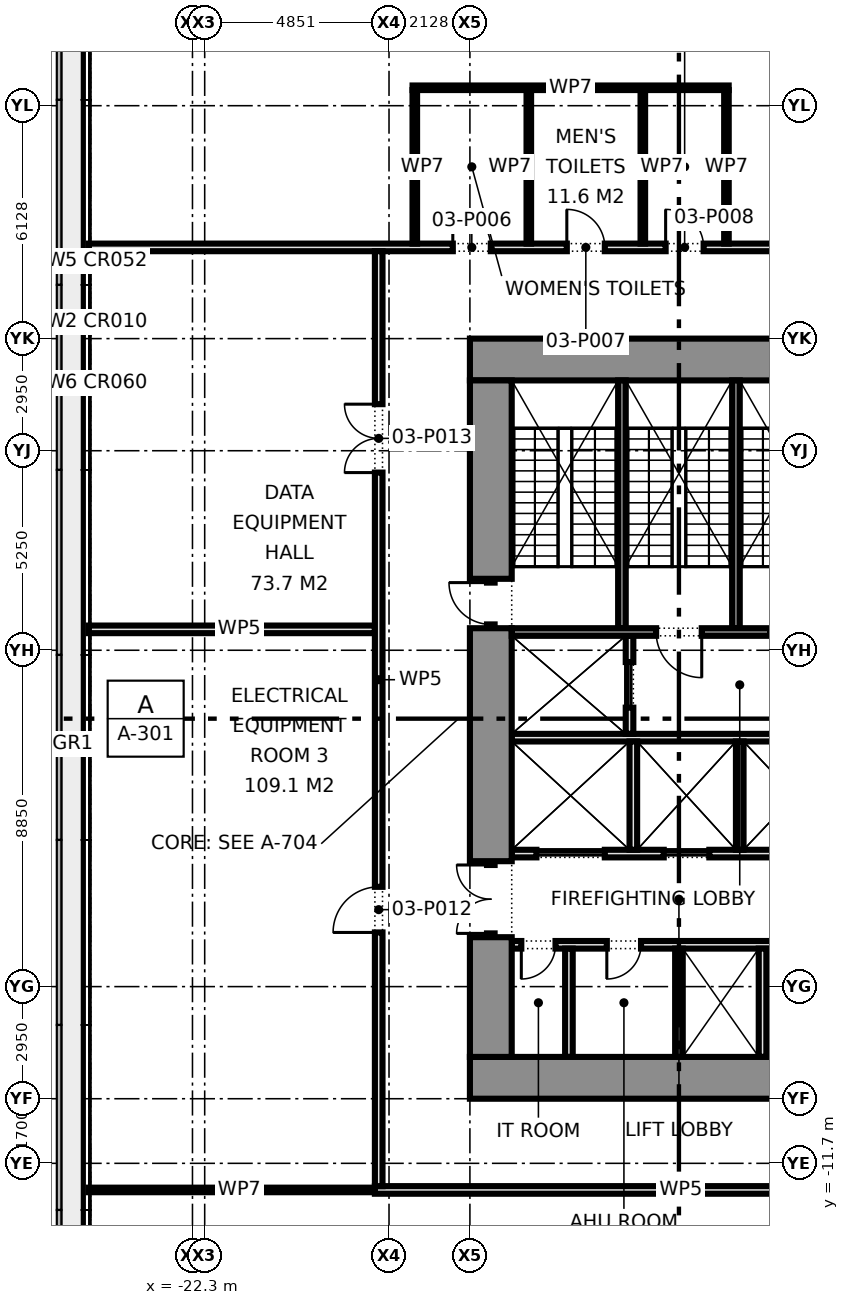
"""IFC4 building model, lengths in metres.
Left out: names, types, materials, properties, quantities, classifications, styles, units other than length and angle.
Written with IfcOpenShell. Run it as: python <this file> out.ifc"""

import sys

from ifc_helpers import new_model, si_unit, direction, frame, frame_2d, origin, place, context, subcontext, project, spatial, rectangle, extrude, element, fill, save


model = new_model("IFC4")
c1 = context("Model", 3, precision=1e-05, world=origin(), true_north=direction((0.0, 1.0)))
c2 = subcontext(c1, "Body", "Model", "MODEL_VIEW")
j1 = project(units=[si_unit("LENGTHUNIT", "METRE"), si_unit("PLANEANGLEUNIT", "RADIAN")], contexts=[c1])
p1 = place(None, origin())
s1 = spatial("IfcSite", under=j1, at=p1, CompositionType="ELEMENT")
p2 = place(p1, origin())
s2 = spatial("IfcBuilding", under=s1, at=p2, CompositionType="ELEMENT")
p3 = place(p2, frame((0.0, 0.0, 11.3)))
s3 = spatial("IfcBuildingStorey", under=s2, at=p3, CompositionType="ELEMENT", Elevation=11.3)
for number, where, z_axis, x_axis in (
    (1, (-15.0, -9.45, 0.0), (0.0, 0.0, 1.0), (1.0, 0.0, 0.0)),
    (2, (-15.0, 9.45, 0.0), (0.0, 0.0, 1.0), (1.0, 0.0, 0.0)),
):
    element("IfcWall", number, at=place(p3, frame(where, z_axis=z_axis, x_axis=x_axis)), inside=s3, PredefinedType="SHEAR", context=c2, shape_type="SweptSolid", body=[
        extrude(rectangle(XDim=11.0, YDim=1.1, at=frame_2d((5.5, 0.0))), origin(), (0.0, 0.0, 1.0), 4.575),
    ])
p4 = place(p3, frame((-14.45, -8.9, 0.0), z_axis=(0.0, 0.0, 1.0), x_axis=(0.0, 1.0, 0.0)))
e3 = element("IfcWall", 3, at=p4, inside=s3, PredefinedType="SHEAR", context=c2, shape_type="SweptSolid", body=[
    extrude(rectangle(XDim=3.15, YDim=1.1, at=frame_2d((1.575, 0.0))), origin(), (0.0, 0.0, 1.0), 4.575),
])
p5 = place(p3, frame((-14.45, -5.75, 0.0), z_axis=(0.0, 0.0, 1.0), x_axis=(0.0, 1.0, 0.0)))
e4 = element("IfcWall", 4, at=p5, inside=s3, PredefinedType="PARTITIONING", context=c2, shape_type="SweptSolid", body=[
    extrude(rectangle(XDim=2.0, YDim=0.2, at=frame_2d((1.0, 0.0))), origin(), (0.0, 0.0, 1.0), 2.4),
])
p6 = place(p5, frame((0.1, 0.0, 0.0)))
e5 = element("IfcOpeningElement", 5, at=p6, cuts=e4, PredefinedType="OPENING", context=c2, shape_type="SweptSolid", body=[
    extrude(rectangle(XDim=1.8, YDim=2.1, at=frame_2d((0.9, 1.05))), frame((0.0, 0.11, 0.0), z_axis=(0.0, -1.0, 0.0), x_axis=(1.0, 0.0, 0.0)), (0.0, 0.0, 1.0), 0.22),
])
p7 = place(p3, frame((-14.45, -3.75, 0.0), z_axis=(0.0, 0.0, 1.0), x_axis=(0.0, 1.0, 0.0)))
e6 = element("IfcWall", 6, at=p7, inside=s3, PredefinedType="SHEAR", context=c2, shape_type="SweptSolid", body=[
    extrude(rectangle(XDim=6.13, YDim=1.1, at=frame_2d((3.065, 0.0))), origin(), (0.0, 0.0, 1.0), 4.575),
])
p8 = place(p3, frame((-14.45, 2.38, 0.0), z_axis=(0.0, 0.0, 1.0), x_axis=(0.0, 1.0, 0.0)))
e7 = element("IfcWall", 7, at=p8, inside=s3, PredefinedType="SHEAR", context=c2, shape_type="SweptSolid", body=[
    extrude(rectangle(XDim=1.3, YDim=0.2, at=frame_2d((0.65, 0.0))), origin(), (0.0, 0.0, 1.0), 2.4),
])
p9 = place(p8, frame((0.1, 0.0, 0.0)))
e8 = element("IfcOpeningElement", 8, at=p9, cuts=e7, PredefinedType="OPENING", context=c2, shape_type="SweptSolid", body=[
    extrude(rectangle(XDim=1.1, YDim=2.1, at=frame_2d((0.55, 1.05))), frame((0.0, 0.11, 0.0), z_axis=(0.0, -1.0, 0.0), x_axis=(1.0, 0.0, 0.0)), (0.0, 0.0, 1.0), 0.22),
])
p10 = place(p3, frame((-14.45, 3.68, 0.0), z_axis=(0.0, 0.0, 1.0), x_axis=(0.0, 1.0, 0.0)))
e9 = element("IfcWall", 9, at=p10, inside=s3, PredefinedType="SHEAR", context=c2, shape_type="SweptSolid", body=[
    extrude(rectangle(XDim=5.22, YDim=1.1, at=frame_2d((2.61, 0.0))), origin(), (0.0, 0.0, 1.0), 4.575),
])
p11 = place(p3, frame((-13.9, -5.95, 0.0), z_axis=(0.0, 0.0, 1.0), x_axis=(1.0, 0.0, 0.0)))
e10 = element("IfcWall", 10, at=p11, inside=s3, PredefinedType="PARTITIONING", context=c2, shape_type="SweptSolid", body=[
    extrude(rectangle(XDim=8.8, YDim=0.2, at=frame_2d((4.4, 0.0))), origin(), (0.0, 0.0, 1.0), 4.575),
])
p12 = place(p11, frame((0.252, 0.0, 0.0)))
e11 = element("IfcOpeningElement", 11, at=p12, cuts=e10, PredefinedType="OPENING", context=c2, shape_type="SweptSolid", body=[
    extrude(rectangle(XDim=0.9, YDim=2.1, at=frame_2d((0.45, 1.05))), frame((0.0, 0.11, 0.0), z_axis=(0.0, -1.0, 0.0), x_axis=(1.0, 0.0, 0.0)), (0.0, 0.0, 1.0), 0.22),
])
p13 = place(p11, frame((2.502, 0.0, 0.0)))
e12 = element("IfcOpeningElement", 12, at=p13, cuts=e10, PredefinedType="OPENING", context=c2, shape_type="SweptSolid", body=[
    extrude(rectangle(XDim=0.9, YDim=2.1, at=frame_2d((0.45, 1.05))), frame((0.0, 0.11, 0.0), z_axis=(0.0, -1.0, 0.0), x_axis=(1.0, 0.0, 0.0)), (0.0, 0.0, 1.0), 0.22),
])
p14 = place(p3, frame((-13.9, -3.55, 0.0), z_axis=(0.0, 0.0, 1.0), x_axis=(1.0, 0.0, 0.0)))
e13 = element("IfcWall", 13, at=p14, inside=s3, PredefinedType="PARTITIONING", context=c2, shape_type="SweptSolid", body=[
    extrude(rectangle(XDim=8.8, YDim=0.2, at=frame_2d((4.4, 0.0))), origin(), (0.0, 0.0, 1.0), 4.575),
])
p15 = place(p14, frame((0.65, 0.0, 0.0)))
e14 = element("IfcOpeningElement", 14, at=p15, cuts=e13, PredefinedType="OPENING", context=c2, shape_type="SweptSolid", body=[
    extrude(rectangle(XDim=1.8, YDim=2.1, at=frame_2d((0.9, 1.05))), frame((0.0, 0.11, 0.0), z_axis=(0.0, -1.0, 0.0), x_axis=(1.0, 0.0, 0.0)), (0.0, 0.0, 1.0), 0.22),
])
p16 = place(p14, frame((4.0, 0.0, 0.0)))
e15 = element("IfcOpeningElement", 15, at=p16, cuts=e13, PredefinedType="OPENING", context=c2, shape_type="SweptSolid", body=[
    extrude(rectangle(XDim=1.2, YDim=2.1, at=frame_2d((0.6, 1.05))), frame((0.0, 0.11, 0.0), z_axis=(0.0, -1.0, 0.0), x_axis=(1.0, 0.0, 0.0)), (0.0, 0.0, 1.0), 0.22),
])
p17 = place(p14, frame((6.85, 0.0, 0.0)))
e16 = element("IfcOpeningElement", 16, at=p17, cuts=e13, PredefinedType="OPENING", context=c2, shape_type="SweptSolid", body=[
    extrude(rectangle(XDim=1.2, YDim=2.1, at=frame_2d((0.6, 1.05))), frame((0.0, 0.11, 0.0), z_axis=(0.0, -1.0, 0.0), x_axis=(1.0, 0.0, 0.0)), (0.0, 0.0, 1.0), 0.22),
])
p18 = place(p3, frame((-13.9, -0.5, 0.0), z_axis=(0.0, 0.0, 1.0), x_axis=(1.0, 0.0, 0.0)))
e17 = element("IfcWall", 17, at=p18, inside=s3, PredefinedType="PARTITIONING", context=c2, shape_type="SweptSolid", body=[
    extrude(rectangle(XDim=8.8, YDim=0.2, at=frame_2d((4.4, 0.0))), origin(), (0.0, 0.0, 1.0), 4.575),
])
p19 = place(p3, frame((-10.8, -0.4, 0.0), z_axis=(0.0, 0.0, 1.0), x_axis=(0.0, 1.0, 0.0)))
e18 = element("IfcWall", 18, at=p19, inside=s3, PredefinedType="PARTITIONING", context=c2, shape_type="SweptSolid", body=[
    extrude(rectangle(XDim=2.58, YDim=0.2, at=frame_2d((1.29, 0.0))), origin(), (0.0, 0.0, 1.0), 4.575),
])
p20 = place(p19, frame((0.69, 0.0, 0.0)))
e19 = element("IfcOpeningElement", 19, at=p20, cuts=e18, PredefinedType="OPENING", context=c2, shape_type="SweptSolid", body=[
    extrude(rectangle(XDim=1.2, YDim=2.1, at=frame_2d((0.6, 1.05))), frame((0.0, 0.11, 0.0), z_axis=(0.0, -1.0, 0.0), x_axis=(1.0, 0.0, 0.0)), (0.0, 0.0, 1.0), 0.22),
])
p21 = place(p3, frame((-13.9, 2.28, 0.0), z_axis=(0.0, 0.0, 1.0), x_axis=(1.0, 0.0, 0.0)))
e20 = element("IfcWall", 20, at=p21, inside=s3, PredefinedType="SHEAR", context=c2, shape_type="SweptSolid", body=[
    extrude(rectangle(XDim=8.8, YDim=0.2, at=frame_2d((4.4, 0.0))), origin(), (0.0, 0.0, 1.0), 4.575),
])
p22 = place(p21, frame((3.8, 0.0, 0.0)))
e21 = element("IfcOpeningElement", 21, at=p22, cuts=e20, PredefinedType="OPENING", context=c2, shape_type="SweptSolid", body=[
    extrude(rectangle(XDim=1.2, YDim=2.1, at=frame_2d((0.6, 1.05))), frame((0.0, 0.11, 0.0), z_axis=(0.0, -1.0, 0.0), x_axis=(1.0, 0.0, 0.0)), (0.0, 0.0, 1.0), 0.22),
])
p23 = place(p21, frame((6.8, 0.0, 0.0)))
e22 = element("IfcOpeningElement", 22, at=p23, cuts=e20, PredefinedType="OPENING", context=c2, shape_type="SweptSolid", body=[
    extrude(rectangle(XDim=1.2, YDim=2.1, at=frame_2d((0.6, 1.05))), frame((0.0, 0.11, 0.0), z_axis=(0.0, -1.0, 0.0), x_axis=(1.0, 0.0, 0.0)), (0.0, 0.0, 1.0), 0.22),
])
for number, where, z_axis, x_axis in (
    (23, (-11.0, 2.38, 0.0), (0.0, 0.0, 1.0), (0.0, 1.0, 0.0)),
    (24, (-8.0, 2.38, 0.0), (0.0, 0.0, 1.0), (0.0, 1.0, 0.0)),
):
    element("IfcWall", number, at=place(p3, frame(where, z_axis=z_axis, x_axis=x_axis)), inside=s3, PredefinedType="SHEAR", context=c2, shape_type="SweptSolid", body=[
        extrude(rectangle(XDim=6.52, YDim=0.2, at=frame_2d((3.26, 0.0))), origin(), (0.0, 0.0, 1.0), 4.575),
    ])
for number, where, z_axis, x_axis in (
    (25, (-9.5, -8.9, 0.0), (0.0, 0.0, 1.0), (0.0, 1.0, 0.0)),
    (26, (-7.3, -8.9, 0.0), (0.0, 0.0, 1.0), (0.0, 1.0, 0.0)),
    (27, (-12.395, -8.9, 0.0), (0.0, 0.0, 1.0), (0.0, 1.0, 0.0)),
    (28, (-10.7, -3.45, 0.0), (0.0, 0.0, 1.0), (0.0, 1.0, 0.0)),
    (29, (-7.9, -3.45, 0.0), (0.0, 0.0, 1.0), (0.0, 1.0, 0.0)),
):
    element("IfcWall", number, at=place(p3, frame(where, z_axis=z_axis, x_axis=x_axis)), inside=s3, PredefinedType="PARTITIONING", context=c2, shape_type="SweptSolid", body=[
        extrude(rectangle(XDim=2.85, YDim=0.2, at=frame_2d((1.425, 0.0))), origin(), (0.0, 0.0, 1.0), 4.575),
    ])
p24 = place(p3, frame((-17.5, -12.4, 0.0), z_axis=(0.0, 0.0, 1.0), x_axis=(1.0, 0.0, 0.0)))
e30 = element("IfcWall", 30, at=p24, inside=s3, PredefinedType="PARTITIONING", context=c2, shape_type="SweptSolid", body=[
    extrude(rectangle(XDim=16.1, YDim=0.2, at=frame_2d((8.05, 0.0))), origin(), (0.0, 0.0, 1.0), 4.575),
])
p25 = place(p3, frame((-25.03, 2.35, 0.0), z_axis=(0.0, 0.0, 1.0), x_axis=(1.0, 0.0, 0.0)))
e31 = element("IfcWall", 31, at=p25, inside=s3, PredefinedType="PARTITIONING", context=c2, shape_type="SweptSolid", body=[
    extrude(rectangle(XDim=7.53, YDim=0.2, at=frame_2d((3.765, 0.0))), origin(), (0.0, 0.0, 1.0), 4.575),
])
p26 = place(p3, frame((-25.03, 12.4, 0.0), z_axis=(0.0, 0.0, 1.0), x_axis=(1.0, 0.0, 0.0)))
e32 = element("IfcWall", 32, at=p26, inside=s3, PredefinedType="PARTITIONING", context=c2, shape_type="SweptSolid", body=[
    extrude(rectangle(XDim=50.06, YDim=0.2, at=frame_2d((25.03, 0.0))), origin(), (0.0, 0.0, 1.0), 4.575),
])
p27 = place(p26, frame((21.18, 0.0, 0.0)))
e33 = element("IfcOpeningElement", 33, at=p27, cuts=e32, PredefinedType="OPENING", context=c2, shape_type="SweptSolid", body=[
    extrude(rectangle(XDim=1.8, YDim=2.1, at=frame_2d((0.9, 1.05))), frame((0.0, 0.11, 0.0), z_axis=(0.0, -1.0, 0.0), x_axis=(1.0, 0.0, 0.0)), (0.0, 0.0, 1.0), 0.22),
])
p28 = place(p26, frame((9.58, 0.0, 0.0)))
e34 = element("IfcOpeningElement", 34, at=p28, cuts=e32, PredefinedType="OPENING", context=c2, shape_type="SweptSolid", body=[
    extrude(rectangle(XDim=1.0, YDim=2.1, at=frame_2d((0.5, 1.05))), frame((0.0, 0.11, 0.0), z_axis=(0.0, -1.0, 0.0), x_axis=(1.0, 0.0, 0.0)), (0.0, 0.0, 1.0), 0.22),
])
p29 = place(p26, frame((12.58, 0.0, 0.0)))
e35 = element("IfcOpeningElement", 35, at=p29, cuts=e32, PredefinedType="OPENING", context=c2, shape_type="SweptSolid", body=[
    extrude(rectangle(XDim=1.0, YDim=2.1, at=frame_2d((0.5, 1.05))), frame((0.0, 0.11, 0.0), z_axis=(0.0, -1.0, 0.0), x_axis=(1.0, 0.0, 0.0)), (0.0, 0.0, 1.0), 0.22),
])
p30 = place(p26, frame((15.18, 0.0, 0.0)))
e36 = element("IfcOpeningElement", 36, at=p30, cuts=e32, PredefinedType="OPENING", context=c2, shape_type="SweptSolid", body=[
    extrude(rectangle(XDim=1.0, YDim=2.1, at=frame_2d((0.5, 1.05))), frame((0.0, 0.11, 0.0), z_axis=(0.0, -1.0, 0.0), x_axis=(1.0, 0.0, 0.0)), (0.0, 0.0, 1.0), 0.22),
])
p31 = place(p26, frame((34.01, 0.0, 0.0)))
e37 = element("IfcOpeningElement", 37, at=p31, cuts=e32, PredefinedType="OPENING", context=c2, shape_type="SweptSolid", body=[
    extrude(rectangle(XDim=1.8, YDim=2.1, at=frame_2d((0.9, 1.05))), frame((0.0, 0.11, 0.0), z_axis=(0.0, -1.0, 0.0), x_axis=(1.0, 0.0, 0.0)), (0.0, 0.0, 1.0), 0.22),
])
p32 = place(p3, frame((-17.4, -12.3, 0.0), z_axis=(0.0, 0.0, 1.0), x_axis=(0.0, 1.0, 0.0)))
e38 = element("IfcWall", 38, at=p32, inside=s3, PredefinedType="PARTITIONING", context=c2, shape_type="SweptSolid", body=[
    extrude(rectangle(XDim=24.6, YDim=0.2, at=frame_2d((12.3, 0.0))), origin(), (0.0, 0.0, 1.0), 4.575),
])
p33 = place(p32, frame((6.675, 0.0, 0.0)))
e39 = element("IfcOpeningElement", 39, at=p33, cuts=e38, PredefinedType="OPENING", context=c2, shape_type="SweptSolid", body=[
    extrude(rectangle(XDim=1.2, YDim=2.1, at=frame_2d((0.6, 1.05))), frame((0.0, 0.11, 0.0), z_axis=(0.0, -1.0, 0.0), x_axis=(1.0, 0.0, 0.0)), (0.0, 0.0, 1.0), 0.22),
])
p34 = place(p32, frame((18.775, 0.0, 0.0)))
e40 = element("IfcOpeningElement", 40, at=p34, cuts=e38, PredefinedType="OPENING", context=c2, shape_type="SweptSolid", body=[
    extrude(rectangle(XDim=1.8, YDim=2.1, at=frame_2d((0.9, 1.05))), frame((0.0, 0.11, 0.0), z_axis=(0.0, -1.0, 0.0), x_axis=(1.0, 0.0, 0.0)), (0.0, 0.0, 1.0), 0.22),
])
p35 = place(p3, frame((-25.03, -12.4, 0.0), z_axis=(0.0, 0.0, 1.0), x_axis=(1.0, 0.0, 0.0)))
e41 = element("IfcWall", 41, at=p35, inside=s3, PredefinedType="PARTITIONING", context=c2, shape_type="SweptSolid", body=[
    extrude(rectangle(XDim=7.53, YDim=0.12, at=frame_2d((3.765, 0.0))), origin(), (0.0, 0.0, 1.0), 4.575),
])
p36 = place(p3, frame((-16.509, 16.6, 0.0), z_axis=(0.0, 0.0, 1.0), x_axis=(1.0, 0.0, 0.0)))
e42 = element("IfcWall", 42, at=p36, inside=s3, PredefinedType="PARTITIONING", context=c2, shape_type="SweptSolid", body=[
    extrude(rectangle(XDim=8.318, YDim=0.12, at=frame_2d((4.159, 0.0))), origin(), (0.0, 0.0, 1.0), 4.575),
])
p37 = place(p3, frame((-8.25, 12.5, 0.0), z_axis=(0.0, 0.0, 1.0), x_axis=(0.0, 1.0, 0.0)))
e43 = element("IfcWall", 43, at=p37, inside=s3, PredefinedType="PARTITIONING", context=c2, shape_type="SweptSolid", body=[
    extrude(rectangle(XDim=4.039, YDim=0.12, at=frame_2d((2.02, 0.0))), origin(), (0.0, 0.0, 1.0), 4.575),
])
for number, where, z_axis, x_axis in (
    (44, (-10.45, 12.5, 0.0), (0.0, 0.0, 1.0), (0.0, 1.0, 0.0)),
    (45, (-13.45, 12.5, 0.0), (0.0, 0.0, 1.0), (0.0, 1.0, 0.0)),
):
    element("IfcWall", number, at=place(p3, frame(where, z_axis=z_axis, x_axis=x_axis)), inside=s3, PredefinedType="PARTITIONING", context=c2, shape_type="SweptSolid", body=[
        extrude(rectangle(XDim=4.04, YDim=0.12, at=frame_2d((2.02, 0.0))), origin(), (0.0, 0.0, 1.0), 4.575),
    ])
p38 = place(p3, frame((-16.45, 12.5, 0.0), z_axis=(0.0, 0.0, 1.0), x_axis=(0.0, 1.0, 0.0)))
e46 = element("IfcWall", 46, at=p38, inside=s3, PredefinedType="PARTITIONING", context=c2, shape_type="SweptSolid", body=[
    extrude(rectangle(XDim=4.039, YDim=0.12, at=frame_2d((2.02, 0.0))), origin(), (0.0, 0.0, 1.0), 4.575),
])
p39 = place(p6, origin())
e47 = element("IfcDoor", 47, at=p39, inside=s3, OperationType="DOUBLE_DOOR_SINGLE_SWING", PredefinedType="DOOR", context=c2, shape_type="SweptSolid", body=[
    extrude(rectangle(XDim=1.8, YDim=2.1, at=frame_2d((0.9, 1.05))), frame((0.0, 0.025, 0.0), z_axis=(0.0, -1.0, 0.0), x_axis=(1.0, 0.0, 0.0)), (0.0, 0.0, 1.0), 0.05),
])
fill(e5, e47)
p40 = place(p9, origin())
e48 = element("IfcDoor", 48, at=p40, inside=s3, OperationType="SINGLE_SWING_RIGHT", PredefinedType="DOOR", context=c2, shape_type="SweptSolid", body=[
    extrude(rectangle(XDim=1.1, YDim=2.1, at=frame_2d((0.55, 1.05))), frame((0.0, 0.025, 0.0), z_axis=(0.0, -1.0, 0.0), x_axis=(1.0, 0.0, 0.0)), (0.0, 0.0, 1.0), 0.05),
])
fill(e8, e48)
p41 = place(p15, origin())
e49 = element("IfcDoor", 49, at=p41, inside=s3, OperationType="DOUBLE_DOOR_SLIDING", PredefinedType="DOOR", context=c2, shape_type="SweptSolid", body=[
    extrude(rectangle(XDim=1.8, YDim=2.1, at=frame_2d((0.9, 1.05))), frame((0.0, 0.025, 0.0), z_axis=(0.0, -1.0, 0.0), x_axis=(1.0, 0.0, 0.0)), (0.0, 0.0, 1.0), 0.05),
])
fill(e14, e49)
p42 = place(p16, origin())
e50 = element("IfcDoor", 50, at=p42, inside=s3, OperationType="DOUBLE_DOOR_SLIDING", PredefinedType="DOOR", context=c2, shape_type="SweptSolid", body=[
    extrude(rectangle(XDim=1.2, YDim=2.1, at=frame_2d((0.6, 1.05))), frame((0.0, 0.025, 0.0), z_axis=(0.0, -1.0, 0.0), x_axis=(1.0, 0.0, 0.0)), (0.0, 0.0, 1.0), 0.05),
])
fill(e15, e50)
p43 = place(p20, origin())
e51 = element("IfcDoor", 51, at=p43, inside=s3, OperationType="DOUBLE_DOOR_SLIDING", PredefinedType="DOOR", context=c2, shape_type="SweptSolid", body=[
    extrude(rectangle(XDim=1.2, YDim=2.1, at=frame_2d((0.6, 1.05))), frame((0.0, 0.025, 0.0), z_axis=(0.0, -1.0, 0.0), x_axis=(1.0, 0.0, 0.0)), (0.0, 0.0, 1.0), 0.05),
])
fill(e19, e51)
p44 = place(p12, frame((0.9, 0.0, 0.0), z_axis=(0.0, 0.0, 1.0), x_axis=(-1.0, 0.0, 0.0)))
e52 = element("IfcDoor", 52, at=p44, inside=s3, OperationType="SINGLE_SWING_RIGHT", PredefinedType="DOOR", context=c2, shape_type="SweptSolid", body=[
    extrude(rectangle(XDim=0.9, YDim=2.1, at=frame_2d((0.45, 1.05))), frame((0.0, 0.025, 0.0), z_axis=(0.0, -1.0, 0.0), x_axis=(1.0, 0.0, 0.0)), (0.0, 0.0, 1.0), 0.05),
])
fill(e11, e52)
p45 = place(p13, frame((0.9, 0.0, 0.0), z_axis=(0.0, 0.0, 1.0), x_axis=(-1.0, 0.0, 0.0)))
e53 = element("IfcDoor", 53, at=p45, inside=s3, OperationType="SINGLE_SWING_RIGHT", PredefinedType="DOOR", context=c2, shape_type="SweptSolid", body=[
    extrude(rectangle(XDim=0.9, YDim=2.1, at=frame_2d((0.45, 1.05))), frame((0.0, 0.025, 0.0), z_axis=(0.0, -1.0, 0.0), x_axis=(1.0, 0.0, 0.0)), (0.0, 0.0, 1.0), 0.05),
])
fill(e12, e53)
p46 = place(p22, frame((1.2, 0.0, 0.0), z_axis=(0.0, 0.0, 1.0), x_axis=(-1.0, 0.0, 0.0)))
e54 = element("IfcDoor", 54, at=p46, inside=s3, OperationType="SINGLE_SWING_LEFT", PredefinedType="DOOR", context=c2, shape_type="SweptSolid", body=[
    extrude(rectangle(XDim=1.2, YDim=2.1, at=frame_2d((0.6, 1.05))), frame((0.0, 0.025, 0.0), z_axis=(0.0, -1.0, 0.0), x_axis=(1.0, 0.0, 0.0)), (0.0, 0.0, 1.0), 0.05),
])
fill(e21, e54)
p47 = place(p28, origin())
e55 = element("IfcDoor", 55, at=p47, inside=s3, OperationType="SINGLE_SWING_LEFT", PredefinedType="DOOR", context=c2, shape_type="SweptSolid", body=[
    extrude(rectangle(XDim=1.0, YDim=2.1, at=frame_2d((0.5, 1.05))), frame((0.0, 0.025, 0.0), z_axis=(0.0, -1.0, 0.0), x_axis=(1.0, 0.0, 0.0)), (0.0, 0.0, 1.0), 0.05),
])
fill(e34, e55)
p48 = place(p29, origin())
e56 = element("IfcDoor", 56, at=p48, inside=s3, OperationType="SINGLE_SWING_LEFT", PredefinedType="DOOR", context=c2, shape_type="SweptSolid", body=[
    extrude(rectangle(XDim=1.0, YDim=2.1, at=frame_2d((0.5, 1.05))), frame((0.0, 0.025, 0.0), z_axis=(0.0, -1.0, 0.0), x_axis=(1.0, 0.0, 0.0)), (0.0, 0.0, 1.0), 0.05),
])
fill(e35, e56)
p49 = place(p30, origin())
e57 = element("IfcDoor", 57, at=p49, inside=s3, OperationType="SINGLE_SWING_LEFT", PredefinedType="DOOR", context=c2, shape_type="SweptSolid", body=[
    extrude(rectangle(XDim=1.0, YDim=2.1, at=frame_2d((0.5, 1.05))), frame((0.0, 0.025, 0.0), z_axis=(0.0, -1.0, 0.0), x_axis=(1.0, 0.0, 0.0)), (0.0, 0.0, 1.0), 0.05),
])
fill(e36, e57)
p50 = place(p33, origin())
e58 = element("IfcDoor", 58, at=p50, inside=s3, OperationType="SINGLE_SWING_LEFT", PredefinedType="DOOR", context=c2, shape_type="SweptSolid", body=[
    extrude(rectangle(XDim=1.2, YDim=2.1, at=frame_2d((0.6, 1.05))), frame((0.0, 0.025, 0.0), z_axis=(0.0, -1.0, 0.0), x_axis=(1.0, 0.0, 0.0)), (0.0, 0.0, 1.0), 0.05),
])
fill(e39, e58)
p51 = place(p34, origin())
e59 = element("IfcDoor", 59, at=p51, inside=s3, OperationType="DOUBLE_DOOR_SINGLE_SWING", PredefinedType="DOOR", context=c2, shape_type="SweptSolid", body=[
    extrude(rectangle(XDim=1.8, YDim=2.1, at=frame_2d((0.9, 1.05))), frame((0.0, 0.025, 0.0), z_axis=(0.0, -1.0, 0.0), x_axis=(1.0, 0.0, 0.0)), (0.0, 0.0, 1.0), 0.05),
])
fill(e40, e59)
save(model, sys.argv[1])
